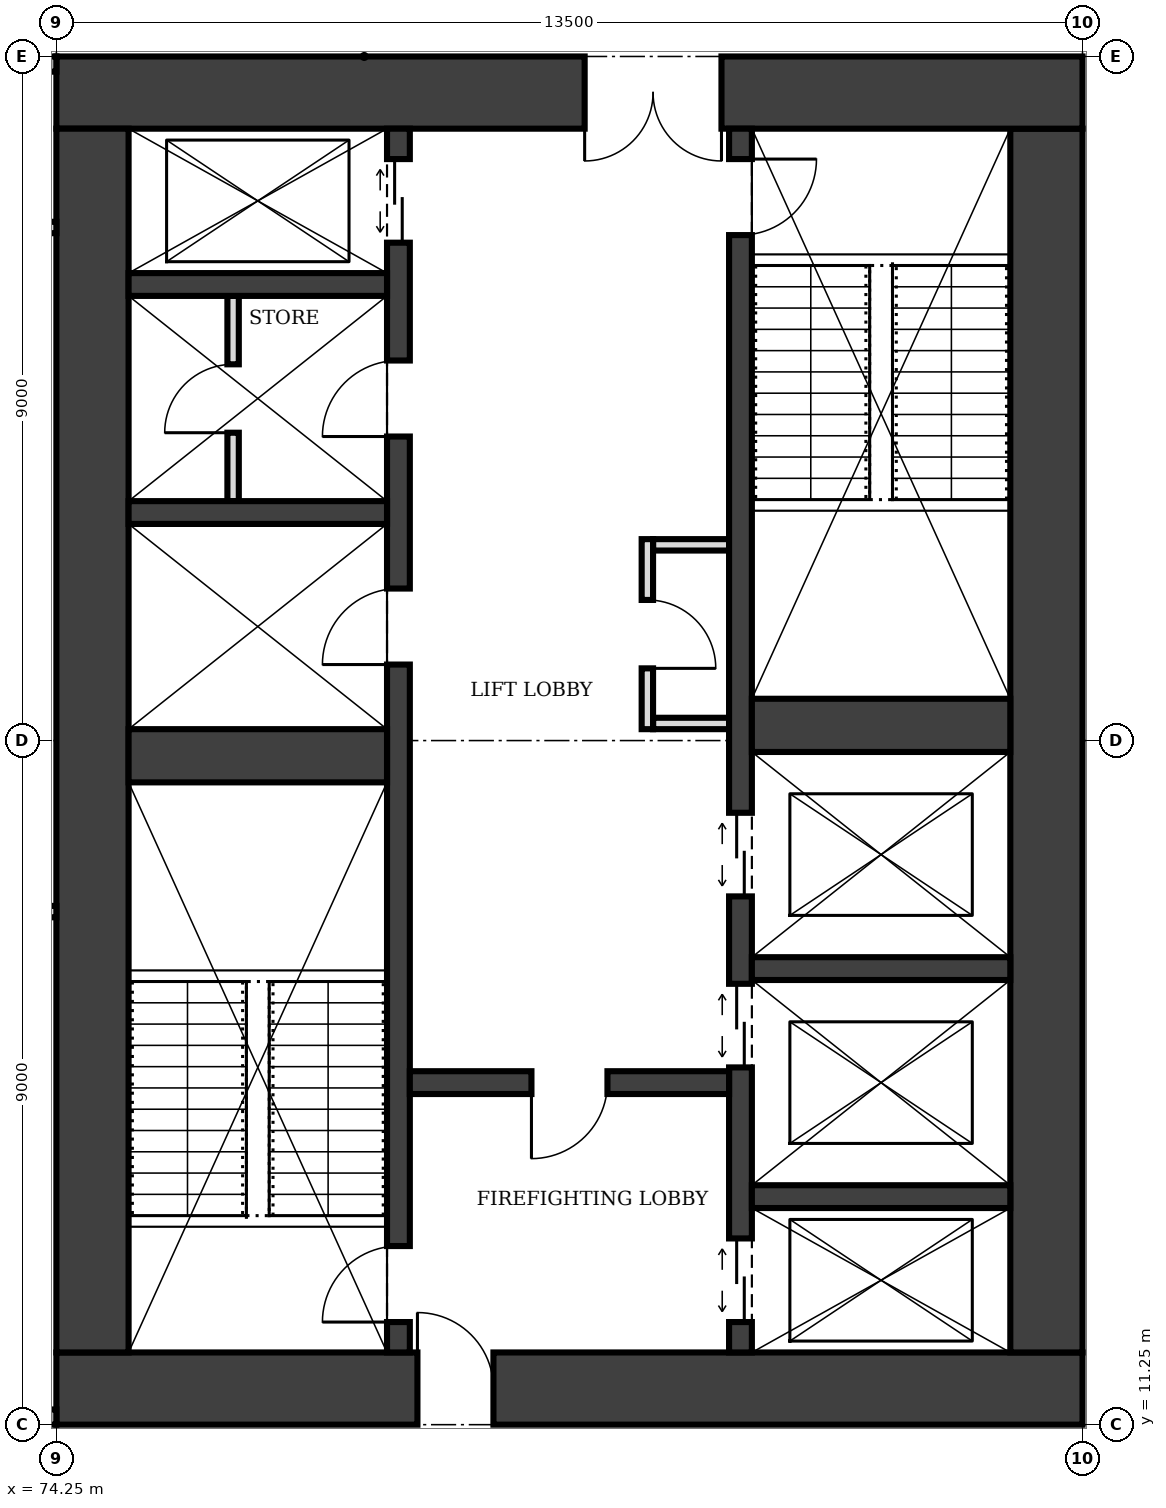
"""IFC4 building model, lengths in metres.
Left out: names, types, materials, properties, quantities, classifications, styles, units other than length and angle.
Written with IfcOpenShell. Run it as: python <this file> out.ifc"""

import sys

from ifc_helpers import new_model, si_unit, direction, frame, frame_2d, origin, place, context, subcontext, project, spatial, rectangle, extrude, element, fill, save


model = new_model("IFC4")
c1 = context("Model", 3, precision=1e-05, world=origin(), true_north=direction((0.0, 1.0)))
c2 = subcontext(c1, "Body", "Model", "MODEL_VIEW")
j1 = project(units=[si_unit("LENGTHUNIT", "METRE"), si_unit("PLANEANGLEUNIT", "RADIAN")], contexts=[c1])
p1 = place(None, origin())
s1 = spatial("IfcSite", under=j1, at=p1, CompositionType="ELEMENT")
p2 = place(p1, origin())
s2 = spatial("IfcBuilding", under=s1, at=p2, CompositionType="ELEMENT")
p3 = place(p2, frame((0.0, 0.0, 145.0)))
s3 = spatial("IfcBuildingStorey", under=s2, at=p3, CompositionType="ELEMENT", Elevation=145.0)
p4 = place(p3, frame((74.25, 11.725, 0.0), z_axis=(0.0, 0.0, 1.0), x_axis=(1.0, 0.0, 0.0)))
e1 = element("IfcWall", 1, at=p4, inside=s3, PredefinedType="SHEAR", context=c2, shape_type="SweptSolid", body=[
    extrude(rectangle(XDim=13.5, YDim=0.95, at=frame_2d((6.75, 0.0))), origin(), (0.0, 0.0, 1.0), 4.0),
])
p5 = place(p4, frame((4.75, 0.0, 0.0)))
e2 = element("IfcOpeningElement", 2, at=p5, cuts=e1, PredefinedType="OPENING", context=c2, shape_type="SweptSolid", body=[
    extrude(rectangle(XDim=1.0, YDim=2.1, at=frame_2d((0.5, 1.05))), frame((0.0, 0.485, 0.0), z_axis=(0.0, -1.0, 0.0), x_axis=(1.0, 0.0, 0.0)), (0.0, 0.0, 1.0), 0.97),
])
p6 = place(p3, frame((87.275, 12.2, 0.0), z_axis=(0.0, 0.0, 1.0), x_axis=(0.0, 1.0, 0.0)))
e3 = element("IfcWall", 3, at=p6, inside=s3, PredefinedType="SHEAR", context=c2, shape_type="SweptSolid", body=[
    extrude(rectangle(XDim=16.1, YDim=0.95, at=frame_2d((8.05, 0.0))), origin(), (0.0, 0.0, 1.0), 4.0),
])
p7 = place(p3, frame((87.75, 28.775, 0.0), z_axis=(0.0, 0.0, 1.0), x_axis=(-1.0, 0.0, 0.0)))
e4 = element("IfcWall", 4, at=p7, inside=s3, PredefinedType="SHEAR", context=c2, shape_type="SweptSolid", body=[
    extrude(rectangle(XDim=13.5, YDim=0.95, at=frame_2d((6.75, 0.0))), origin(), (0.0, 0.0, 1.0), 4.0),
])
p8 = place(p7, frame((4.75, 0.0, 0.0)))
e5 = element("IfcOpeningElement", 5, at=p8, cuts=e4, PredefinedType="OPENING", context=c2, shape_type="SweptSolid", body=[
    extrude(rectangle(XDim=1.8, YDim=2.1, at=frame_2d((0.9, 1.05))), frame((0.0, 0.485, 0.0), z_axis=(0.0, -1.0, 0.0), x_axis=(1.0, 0.0, 0.0)), (0.0, 0.0, 1.0), 0.97),
])
p9 = place(p3, frame((74.725, 28.3, 0.0), z_axis=(0.0, 0.0, 1.0), x_axis=(0.0, -1.0, 0.0)))
e6 = element("IfcWall", 6, at=p9, inside=s3, PredefinedType="SHEAR", context=c2, shape_type="SweptSolid", body=[
    extrude(rectangle(XDim=16.1, YDim=0.95, at=frame_2d((8.05, 0.0))), origin(), (0.0, 0.0, 1.0), 4.0),
])
p10 = place(p3, frame((78.75, 12.2, 0.0), z_axis=(0.0, 0.0, 1.0), x_axis=(0.0, 1.0, 0.0)))
e7 = element("IfcWall", 7, at=p10, inside=s3, PredefinedType="SHEAR", context=c2, shape_type="SweptSolid", body=[
    extrude(rectangle(XDim=16.1, YDim=0.3, at=frame_2d((8.05, 0.0))), origin(), (0.0, 0.0, 1.0), 4.0),
])
p11 = place(p10, frame((0.4, 0.0, 0.0)))
e8 = element("IfcOpeningElement", 8, at=p11, cuts=e7, PredefinedType="OPENING", context=c2, shape_type="SweptSolid", body=[
    extrude(rectangle(XDim=1.0, YDim=2.1, at=frame_2d((0.5, 1.05))), frame((0.0, 0.16, 0.0), z_axis=(0.0, -1.0, 0.0), x_axis=(1.0, 0.0, 0.0)), (0.0, 0.0, 1.0), 0.32),
])
p12 = place(p10, frame((14.6, 0.0, 0.0)))
e9 = element("IfcOpeningElement", 9, at=p12, cuts=e7, PredefinedType="OPENING", context=c2, shape_type="SweptSolid", body=[
    extrude(rectangle(XDim=1.1, YDim=2.1, at=frame_2d((0.55, 1.05))), frame((0.0, 0.16, 0.0), z_axis=(0.0, -1.0, 0.0), x_axis=(1.0, 0.0, 0.0)), (0.0, 0.0, 1.0), 0.32),
])
p13 = place(p10, frame((9.05, 0.0, 0.0)))
e10 = element("IfcOpeningElement", 10, at=p13, cuts=e7, PredefinedType="OPENING", context=c2, shape_type="SweptSolid", body=[
    extrude(rectangle(XDim=1.0, YDim=2.1, at=frame_2d((0.5, 1.05))), frame((0.0, 0.16, 0.0), z_axis=(0.0, -1.0, 0.0), x_axis=(1.0, 0.0, 0.0)), (0.0, 0.0, 1.0), 0.32),
])
p14 = place(p10, frame((12.05, 0.0, 0.0)))
e11 = element("IfcOpeningElement", 11, at=p14, cuts=e7, PredefinedType="OPENING", context=c2, shape_type="SweptSolid", body=[
    extrude(rectangle(XDim=1.0, YDim=2.1, at=frame_2d((0.5, 1.05))), frame((0.0, 0.16, 0.0), z_axis=(0.0, -1.0, 0.0), x_axis=(1.0, 0.0, 0.0)), (0.0, 0.0, 1.0), 0.32),
])
p15 = place(p3, frame((83.25, 12.2, 0.0), z_axis=(0.0, 0.0, 1.0), x_axis=(0.0, 1.0, 0.0)))
e12 = element("IfcWall", 12, at=p15, inside=s3, PredefinedType="SHEAR", context=c2, shape_type="SweptSolid", body=[
    extrude(rectangle(XDim=16.1, YDim=0.3, at=frame_2d((8.05, 0.0))), origin(), (0.0, 0.0, 1.0), 4.0),
])
p16 = place(p15, frame((14.7, 0.0, 0.0)))
e13 = element("IfcOpeningElement", 13, at=p16, cuts=e12, PredefinedType="OPENING", context=c2, shape_type="SweptSolid", body=[
    extrude(rectangle(XDim=1.0, YDim=2.1, at=frame_2d((0.5, 1.05))), frame((0.0, 0.16, 0.0), z_axis=(0.0, -1.0, 0.0), x_axis=(1.0, 0.0, 0.0)), (0.0, 0.0, 1.0), 0.32),
])
p17 = place(p15, frame((0.4, 0.0, 0.0)))
e14 = element("IfcOpeningElement", 14, at=p17, cuts=e12, PredefinedType="OPENING", context=c2, shape_type="SweptSolid", body=[
    extrude(rectangle(XDim=1.1, YDim=2.1, at=frame_2d((0.55, 1.05))), frame((0.0, 0.16, 0.0), z_axis=(0.0, -1.0, 0.0), x_axis=(1.0, 0.0, 0.0)), (0.0, 0.0, 1.0), 0.32),
])
p18 = place(p15, frame((3.75, 0.0, 0.0)))
e15 = element("IfcOpeningElement", 15, at=p18, cuts=e12, PredefinedType="OPENING", context=c2, shape_type="SweptSolid", body=[
    extrude(rectangle(XDim=1.1, YDim=2.1, at=frame_2d((0.55, 1.05))), frame((0.0, 0.16, 0.0), z_axis=(0.0, -1.0, 0.0), x_axis=(1.0, 0.0, 0.0)), (0.0, 0.0, 1.0), 0.32),
])
p19 = place(p15, frame((6.0, 0.0, 0.0)))
e16 = element("IfcOpeningElement", 16, at=p19, cuts=e12, PredefinedType="OPENING", context=c2, shape_type="SweptSolid", body=[
    extrude(rectangle(XDim=1.1, YDim=2.1, at=frame_2d((0.55, 1.05))), frame((0.0, 0.16, 0.0), z_axis=(0.0, -1.0, 0.0), x_axis=(1.0, 0.0, 0.0)), (0.0, 0.0, 1.0), 0.32),
])
p20 = place(p3, frame((75.2, 20.05, 0.0), z_axis=(0.0, 0.0, 1.0), x_axis=(1.0, 0.0, 0.0)))
e17 = element("IfcWall", 17, at=p20, inside=s3, PredefinedType="SHEAR", context=c2, shape_type="SweptSolid", body=[
    extrude(rectangle(XDim=3.4, YDim=0.7, at=frame_2d((1.7, 0.0))), origin(), (0.0, 0.0, 1.0), 4.0),
])
p21 = place(p3, frame((78.9, 15.75, 0.0), z_axis=(0.0, 0.0, 1.0), x_axis=(1.0, 0.0, 0.0)))
e18 = element("IfcWall", 18, at=p21, inside=s3, PredefinedType="SHEAR", context=c2, shape_type="SweptSolid", body=[
    extrude(rectangle(XDim=4.2, YDim=0.3, at=frame_2d((2.1, 0.0))), origin(), (0.0, 0.0, 1.0), 4.0),
])
p22 = place(p21, frame((1.6, 0.0, 0.0)))
e19 = element("IfcOpeningElement", 19, at=p22, cuts=e18, PredefinedType="OPENING", context=c2, shape_type="SweptSolid", body=[
    extrude(rectangle(XDim=1.0, YDim=2.1, at=frame_2d((0.5, 1.05))), frame((0.0, 0.16, 0.0), z_axis=(0.0, -1.0, 0.0), x_axis=(1.0, 0.0, 0.0)), (0.0, 0.0, 1.0), 0.32),
])
for number, where, z_axis, x_axis in (
    (20, (83.4, 14.25, 0.0), (0.0, 0.0, 1.0), (1.0, 0.0, 0.0)),
    (21, (83.4, 17.25, 0.0), (0.0, 0.0, 1.0), (1.0, 0.0, 0.0)),
):
    element("IfcWall", number, at=place(p3, frame(where, z_axis=z_axis, x_axis=x_axis)), inside=s3, PredefinedType="SHEAR", context=c2, shape_type="SweptSolid", body=[
        extrude(rectangle(XDim=3.4, YDim=0.3, at=frame_2d((1.7, 0.0))), origin(), (0.0, 0.0, 1.0), 4.0),
    ])
p23 = place(p3, frame((83.4, 20.45, 0.0), z_axis=(0.0, 0.0, 1.0), x_axis=(1.0, 0.0, 0.0)))
e22 = element("IfcWall", 22, at=p23, inside=s3, PredefinedType="SHEAR", context=c2, shape_type="SweptSolid", body=[
    extrude(rectangle(XDim=3.4, YDim=0.7, at=frame_2d((1.7, 0.0))), origin(), (0.0, 0.0, 1.0), 4.0),
])
for number, where, z_axis, x_axis in (
    (23, (75.2, 23.25, 0.0), (0.0, 0.0, 1.0), (1.0, 0.0, 0.0)),
    (24, (75.2, 26.25, 0.0), (0.0, 0.0, 1.0), (1.0, 0.0, 0.0)),
):
    element("IfcWall", number, at=place(p3, frame(where, z_axis=z_axis, x_axis=x_axis)), inside=s3, PredefinedType="SHEAR", context=c2, shape_type="SweptSolid", body=[
        extrude(rectangle(XDim=3.4, YDim=0.3, at=frame_2d((1.7, 0.0))), origin(), (0.0, 0.0, 1.0), 4.0),
    ])
p24 = place(p3, frame((82.025, 20.4, 0.0), z_axis=(0.0, 0.0, 1.0), x_axis=(0.0, 1.0, 0.0)))
e25 = element("IfcWall", 25, at=p24, inside=s3, PredefinedType="PARTITIONING", context=c2, shape_type="SweptSolid", body=[
    extrude(rectangle(XDim=2.5, YDim=0.15, at=frame_2d((1.25, 0.0))), origin(), (0.0, 0.0, 1.0), 3.75),
])
p25 = place(p24, frame((0.8, 0.0, 0.0)))
e26 = element("IfcOpeningElement", 26, at=p25, cuts=e25, PredefinedType="OPENING", context=c2, shape_type="SweptSolid", body=[
    extrude(rectangle(XDim=0.9, YDim=2.1, at=frame_2d((0.45, 1.05))), frame((0.0, 0.085, 0.0), z_axis=(0.0, -1.0, 0.0), x_axis=(1.0, 0.0, 0.0)), (0.0, 0.0, 1.0), 0.17),
])
for number, where, z_axis, x_axis in (
    (27, (82.1, 20.475, 0.0), (0.0, 0.0, 1.0), (1.0, 0.0, 0.0)),
    (28, (82.1, 22.825, 0.0), (0.0, 0.0, 1.0), (1.0, 0.0, 0.0)),
):
    element("IfcWall", number, at=place(p3, frame(where, z_axis=z_axis, x_axis=x_axis)), inside=s3, PredefinedType="PARTITIONING", context=c2, shape_type="SweptSolid", body=[
        extrude(rectangle(XDim=1.0, YDim=0.15, at=frame_2d((0.5, 0.0))), origin(), (0.0, 0.0, 1.0), 3.75),
    ])
p26 = place(p3, frame((76.575, 23.4, 0.0), z_axis=(0.0, 0.0, 1.0), x_axis=(0.0, 1.0, 0.0)))
e29 = element("IfcWall", 29, at=p26, inside=s3, PredefinedType="PARTITIONING", context=c2, shape_type="SweptSolid", body=[
    extrude(rectangle(XDim=2.7, YDim=0.15, at=frame_2d((1.35, 0.0))), origin(), (0.0, 0.0, 1.0), 3.75),
])
p27 = place(p26, frame((0.9, 0.0, 0.0)))
e30 = element("IfcOpeningElement", 30, at=p27, cuts=e29, PredefinedType="OPENING", context=c2, shape_type="SweptSolid", body=[
    extrude(rectangle(XDim=0.9, YDim=2.1, at=frame_2d((0.45, 1.05))), frame((0.0, 0.085, 0.0), z_axis=(0.0, -1.0, 0.0), x_axis=(1.0, 0.0, 0.0)), (0.0, 0.0, 1.0), 0.17),
])
for number, where, z_axis, x_axis in (
    (31, (68.47, 11.35, 0.0), (0.0, 0.0, 1.0), (1.0, 0.0, 0.0)),
    (32, (68.47, 29.15, 0.0), (0.0, 0.0, 1.0), (1.0, 0.0, 0.0)),
):
    element("IfcWall", number, at=place(p3, frame(where, z_axis=z_axis, x_axis=x_axis)), inside=s3, PredefinedType="SOLIDWALL", context=c2, shape_type="SweptSolid", body=[
        extrude(rectangle(XDim=5.78, YDim=0.2, at=frame_2d((2.89, 0.0))), origin(), (0.0, 0.0, 1.0), 2.85),
    ])
for number, where, z_axis, x_axis in (
    (33, (65.15, 18.0, 0.0), (0.0, 0.0, 1.0), (1.0, 0.0, 0.0)),
    (34, (65.15, 27.0, 0.0), (0.0, 0.0, 1.0), (1.0, 0.0, 0.0)),
):
    element("IfcWall", number, at=place(p3, frame(where, z_axis=z_axis, x_axis=x_axis)), inside=s3, PredefinedType="PARTITIONING", context=c2, shape_type="SweptSolid", body=[
        extrude(rectangle(XDim=9.1, YDim=0.15, at=frame_2d((4.55, 0.0))), origin(), (0.0, 0.0, 1.0), 3.75),
    ])
p28 = place(p5, origin())
e35 = element("IfcDoor", 35, at=p28, inside=s3, OperationType="SINGLE_SWING_LEFT", PredefinedType="DOOR", context=c2, shape_type="SweptSolid", body=[
    extrude(rectangle(XDim=1.0, YDim=2.1, at=frame_2d((0.5, 1.05))), frame((0.0, 0.025, 0.0), z_axis=(0.0, -1.0, 0.0), x_axis=(1.0, 0.0, 0.0)), (0.0, 0.0, 1.0), 0.05),
])
fill(e2, e35)
p29 = place(p8, origin())
e36 = element("IfcDoor", 36, at=p29, inside=s3, OperationType="DOUBLE_DOOR_SINGLE_SWING", PredefinedType="DOOR", context=c2, shape_type="SweptSolid", body=[
    extrude(rectangle(XDim=1.8, YDim=2.1, at=frame_2d((0.9, 1.05))), frame((0.0, 0.025, 0.0), z_axis=(0.0, -1.0, 0.0), x_axis=(1.0, 0.0, 0.0)), (0.0, 0.0, 1.0), 0.05),
])
fill(e5, e36)
p30 = place(p22, frame((1.0, 0.0, 0.0), z_axis=(0.0, 0.0, 1.0), x_axis=(-1.0, 0.0, 0.0)))
e37 = element("IfcDoor", 37, at=p30, inside=s3, OperationType="SINGLE_SWING_RIGHT", PredefinedType="DOOR", context=c2, shape_type="SweptSolid", body=[
    extrude(rectangle(XDim=1.0, YDim=2.1, at=frame_2d((0.5, 1.05))), frame((0.0, 0.025, 0.0), z_axis=(0.0, -1.0, 0.0), x_axis=(1.0, 0.0, 0.0)), (0.0, 0.0, 1.0), 0.05),
])
fill(e19, e37)
p31 = place(p11, origin())
e38 = element("IfcDoor", 38, at=p31, inside=s3, OperationType="SINGLE_SWING_LEFT", PredefinedType="DOOR", context=c2, shape_type="SweptSolid", body=[
    extrude(rectangle(XDim=1.0, YDim=2.1, at=frame_2d((0.5, 1.05))), frame((0.0, 0.025, 0.0), z_axis=(0.0, -1.0, 0.0), x_axis=(1.0, 0.0, 0.0)), (0.0, 0.0, 1.0), 0.05),
])
fill(e8, e38)
p32 = place(p16, frame((1.0, 0.0, 0.0), z_axis=(0.0, 0.0, 1.0), x_axis=(-1.0, 0.0, 0.0)))
e39 = element("IfcDoor", 39, at=p32, inside=s3, OperationType="SINGLE_SWING_LEFT", PredefinedType="DOOR", context=c2, shape_type="SweptSolid", body=[
    extrude(rectangle(XDim=1.0, YDim=2.1, at=frame_2d((0.5, 1.05))), frame((0.0, 0.025, 0.0), z_axis=(0.0, -1.0, 0.0), x_axis=(1.0, 0.0, 0.0)), (0.0, 0.0, 1.0), 0.05),
])
fill(e13, e39)
p33 = place(p17, origin())
e40 = element("IfcDoor", 40, at=p33, inside=s3, OperationType="DOUBLE_DOOR_SLIDING", PredefinedType="DOOR", context=c2, shape_type="SweptSolid", body=[
    extrude(rectangle(XDim=1.1, YDim=2.1, at=frame_2d((0.55, 1.05))), frame((0.0, 0.025, 0.0), z_axis=(0.0, -1.0, 0.0), x_axis=(1.0, 0.0, 0.0)), (0.0, 0.0, 1.0), 0.05),
])
fill(e14, e40)
p34 = place(p12, origin())
e41 = element("IfcDoor", 41, at=p34, inside=s3, OperationType="DOUBLE_DOOR_SLIDING", PredefinedType="DOOR", context=c2, shape_type="SweptSolid", body=[
    extrude(rectangle(XDim=1.1, YDim=2.1, at=frame_2d((0.55, 1.05))), frame((0.0, 0.025, 0.0), z_axis=(0.0, -1.0, 0.0), x_axis=(1.0, 0.0, 0.0)), (0.0, 0.0, 1.0), 0.05),
])
fill(e9, e41)
p35 = place(p18, origin())
e42 = element("IfcDoor", 42, at=p35, inside=s3, OperationType="DOUBLE_DOOR_SLIDING", PredefinedType="DOOR", context=c2, shape_type="SweptSolid", body=[
    extrude(rectangle(XDim=1.1, YDim=2.1, at=frame_2d((0.55, 1.05))), frame((0.0, 0.025, 0.0), z_axis=(0.0, -1.0, 0.0), x_axis=(1.0, 0.0, 0.0)), (0.0, 0.0, 1.0), 0.05),
])
fill(e15, e42)
p36 = place(p19, origin())
e43 = element("IfcDoor", 43, at=p36, inside=s3, OperationType="DOUBLE_DOOR_SLIDING", PredefinedType="DOOR", context=c2, shape_type="SweptSolid", body=[
    extrude(rectangle(XDim=1.1, YDim=2.1, at=frame_2d((0.55, 1.05))), frame((0.0, 0.025, 0.0), z_axis=(0.0, -1.0, 0.0), x_axis=(1.0, 0.0, 0.0)), (0.0, 0.0, 1.0), 0.05),
])
fill(e16, e43)
p37 = place(p25, frame((0.9, 0.0, 0.0), z_axis=(0.0, 0.0, 1.0), x_axis=(-1.0, 0.0, 0.0)))
e44 = element("IfcDoor", 44, at=p37, inside=s3, OperationType="SINGLE_SWING_RIGHT", PredefinedType="DOOR", context=c2, shape_type="SweptSolid", body=[
    extrude(rectangle(XDim=0.9, YDim=2.1, at=frame_2d((0.45, 1.05))), frame((0.0, 0.025, 0.0), z_axis=(0.0, -1.0, 0.0), x_axis=(1.0, 0.0, 0.0)), (0.0, 0.0, 1.0), 0.05),
])
fill(e26, e44)
p38 = place(p13, origin())
e45 = element("IfcDoor", 45, at=p38, inside=s3, OperationType="SINGLE_SWING_LEFT", PredefinedType="DOOR", context=c2, shape_type="SweptSolid", body=[
    extrude(rectangle(XDim=1.0, YDim=2.1, at=frame_2d((0.5, 1.05))), frame((0.0, 0.025, 0.0), z_axis=(0.0, -1.0, 0.0), x_axis=(1.0, 0.0, 0.0)), (0.0, 0.0, 1.0), 0.05),
])
fill(e10, e45)
p39 = place(p14, origin())
e46 = element("IfcDoor", 46, at=p39, inside=s3, OperationType="SINGLE_SWING_LEFT", PredefinedType="DOOR", context=c2, shape_type="SweptSolid", body=[
    extrude(rectangle(XDim=1.0, YDim=2.1, at=frame_2d((0.5, 1.05))), frame((0.0, 0.025, 0.0), z_axis=(0.0, -1.0, 0.0), x_axis=(1.0, 0.0, 0.0)), (0.0, 0.0, 1.0), 0.05),
])
fill(e11, e46)
p40 = place(p27, origin())
e47 = element("IfcDoor", 47, at=p40, inside=s3, OperationType="SINGLE_SWING_LEFT", PredefinedType="DOOR", context=c2, shape_type="SweptSolid", body=[
    extrude(rectangle(XDim=0.9, YDim=2.1, at=frame_2d((0.45, 1.05))), frame((0.0, 0.025, 0.0), z_axis=(0.0, -1.0, 0.0), x_axis=(1.0, 0.0, 0.0)), (0.0, 0.0, 1.0), 0.05),
])
fill(e30, e47)
save(model, sys.argv[1])
